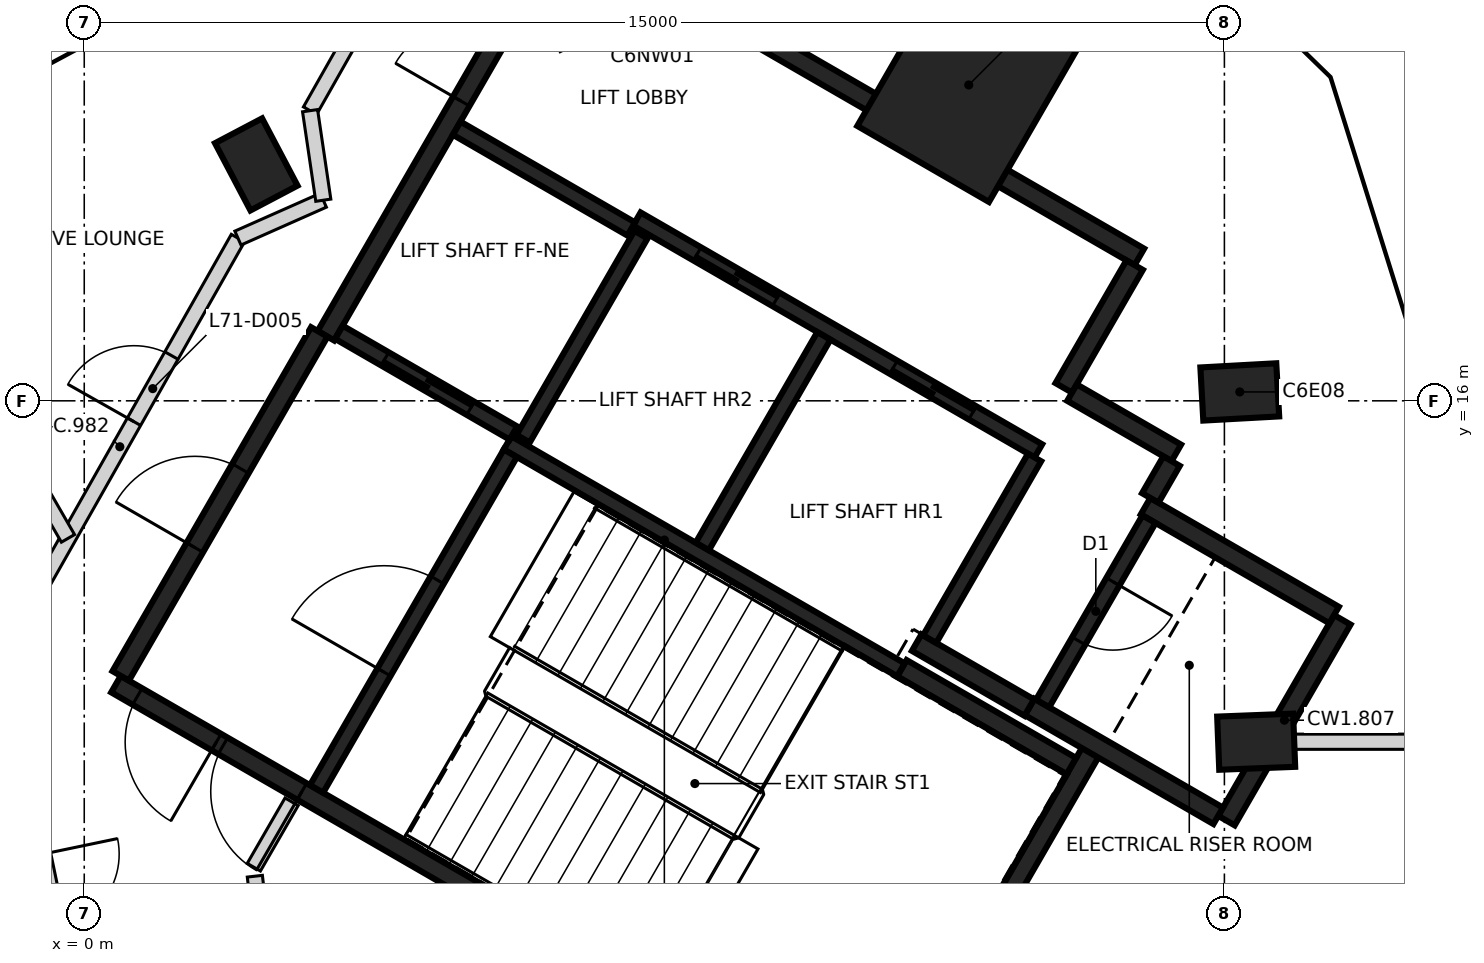
"""IFC4 building model, lengths in metres.
Left out: names, types, materials, properties, quantities, classifications, styles, units other than length and angle.
Written with IfcOpenShell. Run it as: python <this file> out.ifc"""

import sys

from ifc_helpers import new_model, si_unit, direction, frame, frame_2d, origin, origin_2d, place, context, subcontext, project, spatial, rectangle, extrude, element, fill, save


model = new_model("IFC4")
c1 = context("Model", 3, precision=1e-05, world=origin(), true_north=direction((0.0, 1.0)))
c2 = subcontext(c1, "Body", "Model", "MODEL_VIEW")
j1 = project(units=[si_unit("LENGTHUNIT", "METRE"), si_unit("PLANEANGLEUNIT", "RADIAN")], contexts=[c1])
p1 = place(None, origin())
s1 = spatial("IfcSite", under=j1, at=p1, CompositionType="ELEMENT")
p2 = place(p1, origin())
s2 = spatial("IfcBuilding", under=s1, at=p2, CompositionType="ELEMENT")
p3 = place(p2, frame((0.0, 0.0, 280.2)))
s3 = spatial("IfcBuildingStorey", under=s2, at=p3, CompositionType="ELEMENT", Elevation=280.2)
for number, where, z_axis, x_axis in (
    (1, (15.418, 11.515, -0.35), (0.0, 0.0, 1.0), (0.999, 0.039, 0.0)),
    (2, (15.202, 16.117, -0.35), (0.0, 0.0, 1.0), (0.998, 0.055, 0.0)),
    (3, (2.263, 19.11, -0.35), (0.0, 0.0, 1.0), (-0.466, 0.885, 0.0)),
):
    element("IfcColumn", number, at=place(p3, frame(where, z_axis=z_axis, x_axis=x_axis)), inside=s3, PredefinedType="COLUMN", context=c2, shape_type="SweptSolid", body=[
        extrude(rectangle(XDim=1.0, YDim=0.7, at=origin_2d()), origin(), (0.0, 0.0, 1.0), 3.6),
    ])
p4 = place(p3, frame((11.637, 20.155, -0.35), z_axis=(0.0, 0.0, 1.0), x_axis=(0.5, 0.866025403784, 0.0)))
e4 = element("IfcColumn", 4, at=p4, inside=s3, PredefinedType="COLUMN", context=c2, shape_type="SweptSolid", body=[
    extrude(rectangle(XDim=2.4, YDim=2.0, at=origin_2d()), origin(), (0.0, 0.0, 1.0), 3.6),
])
p5 = place(p3, frame((10.42, 6.498, 0.0), z_axis=(0.0, 0.0, 1.0), x_axis=(-0.866021906294, 0.500006057782, 0.0)))
e5 = element("IfcWall", 5, at=p5, inside=s3, PredefinedType="SHEAR", context=c2, shape_type="SweptSolid", body=[
    extrude(rectangle(XDim=11.55, YDim=0.25, at=frame_2d((5.775, 0.0))), origin(), (0.0, 0.0, 1.0), 3.25),
])
p6 = place(p5, frame((10.025, 0.0, 0.0)))
e6 = element("IfcOpeningElement", 6, at=p6, cuts=e5, PredefinedType="OPENING", context=c2, shape_type="SweptSolid", body=[
    extrude(rectangle(XDim=1.2, YDim=2.1, at=frame_2d((0.6, 1.05))), frame((0.0, 0.135, 0.0), z_axis=(0.0, -1.0, 0.0), x_axis=(1.0, 0.0, 0.0)), (0.0, 0.0, 1.0), 0.27),
])
p7 = place(p5, frame((8.725, 0.0, 0.0)))
e7 = element("IfcOpeningElement", 7, at=p7, cuts=e5, PredefinedType="OPENING", context=c2, shape_type="SweptSolid", body=[
    extrude(rectangle(XDim=1.2, YDim=2.1, at=frame_2d((0.6, 1.05))), frame((0.0, 0.135, 0.0), z_axis=(0.0, -1.0, 0.0), x_axis=(1.0, 0.0, 0.0)), (0.0, 0.0, 1.0), 0.27),
])
p8 = place(p3, frame((6.304, 22.269, 0.0), z_axis=(0.0, 0.0, 1.0), x_axis=(0.866022959057, -0.500004234368, 0.0)))
e8 = element("IfcWall", 8, at=p8, inside=s3, PredefinedType="SHEAR", context=c2, shape_type="SweptSolid", body=[
    extrude(rectangle(XDim=8.75, YDim=0.25, at=frame_2d((4.375, 0.0))), origin(), (0.0, 0.0, 1.0), 3.25),
])
p9 = place(p3, frame((3.179, 16.856, 0.0), z_axis=(0.0, 0.0, 1.0), x_axis=(0.500001955336, 0.866024274868, 0.0)))
e9 = element("IfcWall", 9, at=p9, inside=s3, PredefinedType="SHEAR", context=c2, shape_type="SweptSolid", body=[
    extrude(rectangle(XDim=6.125, YDim=0.25, at=frame_2d((3.062, 0.0))), origin(), (0.0, 0.0, 1.0), 3.25),
])
p10 = place(p9, frame((3.563, 0.0, 0.0)))
e10 = element("IfcOpeningElement", 10, at=p10, cuts=e9, PredefinedType="OPENING", context=c2, shape_type="SweptSolid", body=[
    extrude(rectangle(XDim=1.0, YDim=2.1, at=frame_2d((0.5, 1.05))), frame((0.0, 0.135, 0.0), z_axis=(0.0, -1.0, 0.0), x_axis=(1.0, 0.0, 0.0)), (0.0, 0.0, 1.0), 0.27),
])
p11 = place(p3, frame((0.48, 12.381, 0.0), z_axis=(0.0, 0.0, 1.0), x_axis=(0.49999885962, 0.866026062182, 0.0)))
e11 = element("IfcWall", 11, at=p11, inside=s3, PredefinedType="SHEAR", context=c2, shape_type="SweptSolid", body=[
    extrude(rectangle(XDim=5.225, YDim=0.25, at=frame_2d((2.612, 0.0))), origin(), (0.0, 0.0, 1.0), 3.25),
])
p12 = place(p11, frame((1.95, 0.0, 0.0)))
e12 = element("IfcOpeningElement", 12, at=p12, cuts=e11, PredefinedType="OPENING", context=c2, shape_type="SweptSolid", body=[
    extrude(rectangle(XDim=1.2, YDim=2.1, at=frame_2d((0.6, 1.05))), frame((0.0, 0.135, 0.0), z_axis=(0.0, -1.0, 0.0), x_axis=(1.0, 0.0, 0.0)), (0.0, 0.0, 1.0), 0.27),
])
p13 = place(p3, frame((13.238, 11.378, 0.0), z_axis=(0.0, 0.0, 1.0), x_axis=(-0.500008851346, -0.866020293397, 0.0)))
e13 = element("IfcWall", 13, at=p13, inside=s3, PredefinedType="SHEAR", context=c2, shape_type="SweptSolid", body=[
    extrude(rectangle(XDim=5.51, YDim=0.25, at=frame_2d((2.755, 0.0))), origin(), (0.0, 0.0, 1.0), 3.25),
])
p14 = place(p3, frame((16.552, 13.119, 0.0), z_axis=(0.0, 0.0, 1.0), x_axis=(-0.499978833458, -0.866037623948, 0.0)))
e14 = element("IfcWall", 14, at=p14, inside=s3, PredefinedType="SHEAR", context=c2, shape_type="SweptSolid", body=[
    extrude(rectangle(XDim=3.05, YDim=0.25, at=frame_2d((1.525, 0.0))), origin(), (0.0, 0.0, 1.0), 3.25),
])
p15 = place(p3, frame((14.918, 10.54, 0.0), z_axis=(0.0, 0.0, 1.0), x_axis=(-0.866063538972, 0.499933942099, 0.0)))
e15 = element("IfcWall", 15, at=p15, inside=s3, PredefinedType="SHEAR", context=c2, shape_type="SweptSolid", body=[
    extrude(rectangle(XDim=2.865, YDim=0.25, at=frame_2d((1.432, 0.0))), origin(), (0.0, 0.0, 1.0), 3.25),
])
p16 = place(p3, frame((13.963, 14.614, 0.0), z_axis=(0.0, 0.0, 1.0), x_axis=(0.866042235819, -0.499970844928, 0.0)))
e16 = element("IfcWall", 16, at=p16, inside=s3, PredefinedType="SHEAR", context=c2, shape_type="SweptSolid", body=[
    extrude(rectangle(XDim=2.865, YDim=0.25, at=frame_2d((1.432, 0.0))), origin(), (0.0, 0.0, 1.0), 3.25),
])
p17 = place(p3, frame((10.757, 12.481, 0.0), z_axis=(0.0, 0.0, 1.0), x_axis=(0.866022940537, -0.500004266446, 0.0)))
e17 = element("IfcWall", 17, at=p17, inside=s3, PredefinedType="SHEAR", context=c2, shape_type="SweptSolid", body=[
    extrude(rectangle(XDim=2.575, YDim=0.25, at=frame_2d((1.287, 0.0))), origin(), (0.0, 0.0, 1.0), 3.25),
])
p18 = place(p3, frame((13.819, 17.785, 0.0), z_axis=(0.0, 0.0, 1.0), x_axis=(-0.500039802285, -0.866002422705, 0.0)))
e18 = element("IfcWall", 18, at=p18, inside=s3, PredefinedType="SHEAR", context=c2, shape_type="SweptSolid", body=[
    extrude(rectangle(XDim=1.865, YDim=0.25, at=frame_2d((0.932, 0.0))), origin(), (0.0, 0.0, 1.0), 3.25),
])
p19 = place(p3, frame((12.433, 11.964, 0.0), z_axis=(0.0, 0.0, 1.0), x_axis=(-0.866038183914, 0.499977863513, 0.0)))
e19 = element("IfcWall", 19, at=p19, inside=s3, PredefinedType="SHEAR", context=c2, shape_type="SweptSolid", body=[
    extrude(rectangle(XDim=1.71, YDim=0.25, at=frame_2d((0.855, 0.0))), origin(), (0.0, 0.0, 1.0), 3.25),
])
p20 = place(p3, frame((12.995, 16.108, 0.0), z_axis=(0.0, 0.0, 1.0), x_axis=(0.866044474677, -0.49996696679, 0.0)))
e20 = element("IfcWall", 20, at=p20, inside=s3, PredefinedType="SHEAR", context=c2, shape_type="SweptSolid", body=[
    extrude(rectangle(XDim=1.584, YDim=0.25, at=frame_2d((0.792, 0.0))), origin(), (0.0, 0.0, 1.0), 3.25),
])
p21 = place(p3, frame((14.305, 15.207, 0.0), z_axis=(0.0, 0.0, 1.0), x_axis=(-0.499848422343, -0.866112899501, 0.0)))
e21 = element("IfcWall", 21, at=p21, inside=s3, PredefinedType="SHEAR", context=c2, shape_type="SweptSolid", body=[
    extrude(rectangle(XDim=0.559, YDim=0.25, at=frame_2d((0.28, 0.0))), origin(), (0.0, 0.0, 1.0), 3.25),
])
p22 = place(p3, frame((12.552, 15.342, 0.0), z_axis=(0.0, 0.0, 1.0), x_axis=(-0.866030299012, 0.499991521122, 0.0)))
e22 = element("IfcWall", 22, at=p22, inside=s3, PredefinedType="SHEAR", context=c2, shape_type="SweptSolid", body=[
    extrude(rectangle(XDim=6.1, YDim=0.2, at=frame_2d((3.05, 0.0))), origin(), (0.0, 0.0, 1.0), 3.25),
])
p23 = place(p22, frame((1.0, 0.0, 0.0)))
e23 = element("IfcOpeningElement", 23, at=p23, cuts=e22, PredefinedType="OPENING", context=c2, shape_type="SweptSolid", body=[
    extrude(rectangle(XDim=1.2, YDim=2.1, at=frame_2d((0.6, 1.05))), frame((0.0, 0.11, 0.0), z_axis=(0.0, -1.0, 0.0), x_axis=(1.0, 0.0, 0.0)), (0.0, 0.0, 1.0), 0.22),
])
p24 = place(p22, frame((3.982, 0.0, 0.0)))
e24 = element("IfcOpeningElement", 24, at=p24, cuts=e22, PredefinedType="OPENING", context=c2, shape_type="SweptSolid", body=[
    extrude(rectangle(XDim=1.2, YDim=2.1, at=frame_2d((0.6, 1.05))), frame((0.0, 0.11, 0.0), z_axis=(0.0, -1.0, 0.0), x_axis=(1.0, 0.0, 0.0)), (0.0, 0.0, 1.0), 0.22),
])
p25 = place(p3, frame((10.743, 12.46, 0.0), z_axis=(0.0, 0.0, 1.0), x_axis=(-0.866018848283, 0.500011354289, 0.0)))
e25 = element("IfcWall", 25, at=p25, inside=s3, PredefinedType="SHEAR", context=c2, shape_type="SweptSolid", body=[
    extrude(rectangle(XDim=5.974, YDim=0.2, at=frame_2d((2.987, 0.0))), origin(), (0.0, 0.0, 1.0), 3.25),
])
p26 = place(p3, frame((3.057, 10.895, 0.0), z_axis=(0.0, 0.0, 1.0), x_axis=(0.500027839223, 0.866009330205, 0.0)))
e26 = element("IfcWall", 26, at=p26, inside=s3, PredefinedType="SHEAR", context=c2, shape_type="SweptSolid", body=[
    extrude(rectangle(XDim=5.098, YDim=0.2, at=frame_2d((2.549, 0.0))), origin(), (0.0, 0.0, 1.0), 3.25),
])
p27 = place(p26, frame((1.774, 0.0, 0.0)))
e27 = element("IfcOpeningElement", 27, at=p27, cuts=e26, PredefinedType="OPENING", context=c2, shape_type="SweptSolid", body=[
    extrude(rectangle(XDim=1.4, YDim=2.1, at=frame_2d((0.7, 1.05))), frame((0.0, 0.11, 0.0), z_axis=(0.0, -1.0, 0.0), x_axis=(1.0, 0.0, 0.0)), (0.0, 0.0, 1.0), 0.22),
])
p28 = place(p3, frame((8.132, 14.084, 0.0), z_axis=(0.0, 0.0, 1.0), x_axis=(0.500030834389, 0.86600760081, 0.0)))
e28 = element("IfcWall", 28, at=p28, inside=s3, PredefinedType="SHEAR", context=c2, shape_type="SweptSolid", body=[
    extrude(rectangle(XDim=3.198, YDim=0.2, at=frame_2d((1.599, 0.0))), origin(), (0.0, 0.0, 1.0), 3.25),
])
p29 = place(p3, frame((14.008, 14.442, 0.0), z_axis=(0.0, 0.0, 1.0), x_axis=(-0.499986818241, -0.866033014143, 0.0)))
e29 = element("IfcWall", 29, at=p29, inside=s3, PredefinedType="SHEAR", context=c2, shape_type="SweptSolid", body=[
    extrude(rectangle(XDim=2.798, YDim=0.2, at=frame_2d((1.399, 0.0))), origin(), (0.0, 0.0, 1.0), 3.25),
])
p30 = place(p29, frame((0.949, 0.0, 0.0)))
e30 = element("IfcOpeningElement", 30, at=p30, cuts=e29, PredefinedType="OPENING", context=c2, shape_type="SweptSolid", body=[
    extrude(rectangle(XDim=0.9, YDim=2.1, at=frame_2d((0.45, 1.05))), frame((0.0, 0.11, 0.0), z_axis=(0.0, -1.0, 0.0), x_axis=(1.0, 0.0, 0.0)), (0.0, 0.0, 1.0), 0.22),
])
p31 = place(p3, frame((12.502, 15.255, 0.0), z_axis=(0.0, 0.0, 1.0), x_axis=(-0.499965018551, -0.866045599391, 0.0)))
e31 = element("IfcWall", 31, at=p31, inside=s3, PredefinedType="SHEAR", context=c2, shape_type="SweptSolid", body=[
    extrude(rectangle(XDim=2.759, YDim=0.2, at=frame_2d((1.379, 0.0))), origin(), (0.0, 0.0, 1.0), 3.25),
])
p32 = place(p3, frame((7.324, 18.187, 0.0), z_axis=(0.0, 0.0, 1.0), x_axis=(-0.499967891604, -0.866043940782, 0.0)))
e32 = element("IfcWall", 32, at=p32, inside=s3, PredefinedType="SHEAR", context=c2, shape_type="SweptSolid", body=[
    extrude(rectangle(XDim=3.1, YDim=0.2, at=frame_2d((1.55, 0.0))), origin(), (0.0, 0.0, 1.0), 3.25),
])
p33 = place(p3, frame((5.646, 15.576, 0.0), z_axis=(0.0, 0.0, 1.0), x_axis=(-0.866018407898, 0.500012117035, 0.0)))
e33 = element("IfcWall", 33, at=p33, inside=s3, PredefinedType="SHEAR", context=c2, shape_type="SweptSolid", body=[
    extrude(rectangle(XDim=2.651, YDim=0.2, at=frame_2d((1.325, 0.0))), origin(), (0.0, 0.0, 1.0), 3.25),
])
p34 = place(p33, frame((0.652, 0.0, 0.0)))
e34 = element("IfcOpeningElement", 34, at=p34, cuts=e33, PredefinedType="OPENING", context=c2, shape_type="SweptSolid", body=[
    extrude(rectangle(XDim=1.3, YDim=2.1, at=frame_2d((0.65, 1.05))), frame((0.0, 0.11, 0.0), z_axis=(0.0, -1.0, 0.0), x_axis=(1.0, 0.0, 0.0)), (0.0, 0.0, 1.0), 0.22),
])
p35 = place(p3, frame((7.196, 18.26, 0.0), z_axis=(0.0, 0.0, 1.0), x_axis=(-0.866018407898, 0.500012117035, 0.0)))
e35 = element("IfcWall", 35, at=p35, inside=s3, PredefinedType="SHEAR", context=c2, shape_type="SweptSolid", body=[
    extrude(rectangle(XDim=2.651, YDim=0.2, at=frame_2d((1.325, 0.0))), origin(), (0.0, 0.0, 1.0), 3.25),
])
p36 = place(p3, frame((-1.086, 12.65, 0.0), z_axis=(0.0, 0.0, 1.0), x_axis=(0.492563383526, 0.870276572826, 0.0)))
e36 = element("IfcWall", 36, at=p36, inside=s3, PredefinedType="PARTITIONING", context=c2, shape_type="SweptSolid", body=[
    extrude(rectangle(XDim=6.309, YDim=0.2, at=frame_2d((3.155, 0.0))), origin(), (0.0, 0.0, 1.0), 3.25),
])
p37 = place(p36, frame((3.533, 0.0, 0.0)))
e37 = element("IfcOpeningElement", 37, at=p37, cuts=e36, PredefinedType="OPENING", context=c2, shape_type="SweptSolid", body=[
    extrude(rectangle(XDim=1.0, YDim=2.1, at=frame_2d((0.5, 1.05))), frame((0.0, 0.11, 0.0), z_axis=(0.0, -1.0, 0.0), x_axis=(1.0, 0.0, 0.0)), (0.0, 0.0, 1.0), 0.22),
])
p38 = place(p3, frame((-1.085, 12.65, 0.0), z_axis=(0.0, 0.0, 1.0), x_axis=(0.203998862084, -0.97897112535, 0.0)))
e38 = element("IfcWall", 38, at=p38, inside=s3, PredefinedType="PARTITIONING", context=c2, shape_type="SweptSolid", body=[
    extrude(rectangle(XDim=6.338, YDim=0.2, at=frame_2d((3.169, 0.0))), origin(), (0.0, 0.0, 1.0), 3.25),
])
p39 = place(p38, frame((2.669, 0.0, 0.0)))
e39 = element("IfcOpeningElement", 39, at=p39, cuts=e38, PredefinedType="OPENING", context=c2, shape_type="SweptSolid", body=[
    extrude(rectangle(XDim=1.0, YDim=2.1, at=frame_2d((0.5, 1.05))), frame((0.0, 0.11, 0.0), z_axis=(0.0, -1.0, 0.0), x_axis=(1.0, 0.0, 0.0)), (0.0, 0.0, 1.0), 0.22),
])
p40 = place(p3, frame((2.022, 18.141, 0.0), z_axis=(0.0, 0.0, 1.0), x_axis=(0.914212683456, 0.405234709036, 0.0)))
e40 = element("IfcWall", 40, at=p40, inside=s3, PredefinedType="PARTITIONING", context=c2, shape_type="SweptSolid", body=[
    extrude(rectangle(XDim=1.229, YDim=0.2, at=frame_2d((0.614, 0.0))), origin(), (0.0, 0.0, 1.0), 3.25),
])
p41 = place(p3, frame((2.592, 6.719, 0.0), z_axis=(0.0, 0.0, 1.0), x_axis=(-0.114027951455, 0.993477541914, 0.0)))
e41 = element("IfcWall", 41, at=p41, inside=s3, PredefinedType="PARTITIONING", context=c2, shape_type="SweptSolid", body=[
    extrude(rectangle(XDim=3.047, YDim=0.2, at=frame_2d((1.523, 0.0))), origin(), (0.0, 0.0, 1.0), 3.25),
])
p42 = place(p41, frame((1.083, 0.0, 0.0)))
e42 = element("IfcOpeningElement", 42, at=p42, cuts=e41, PredefinedType="OPENING", context=c2, shape_type="SweptSolid", body=[
    extrude(rectangle(XDim=1.0, YDim=2.1, at=frame_2d((0.5, 1.05))), frame((0.0, 0.11, 0.0), z_axis=(0.0, -1.0, 0.0), x_axis=(1.0, 0.0, 0.0)), (0.0, 0.0, 1.0), 0.22),
])
p43 = place(p3, frame((2.231, 9.864, 0.0), z_axis=(0.0, 0.0, 1.0), x_axis=(0.499942098031, 0.866058830921, 0.0)))
e43 = element("IfcWall", 43, at=p43, inside=s3, PredefinedType="PARTITIONING", context=c2, shape_type="SweptSolid", body=[
    extrude(rectangle(XDim=0.994, YDim=0.2, at=frame_2d((0.497, 0.0))), origin(), (0.0, 0.0, 1.0), 3.25),
])
p44 = place(p3, frame((2.971, 19.817, 0.0), z_axis=(0.0, 0.0, 1.0), x_axis=(0.492596700535, 0.870257715061, 0.0)))
e44 = element("IfcWall", 44, at=p44, inside=s3, PredefinedType="PARTITIONING", context=c2, shape_type="SweptSolid", body=[
    extrude(rectangle(XDim=2.296, YDim=0.2, at=frame_2d((1.148, 0.0))), origin(), (0.0, 0.0, 1.0), 3.25),
])
p45 = place(p3, frame((2.971, 19.817, 0.0), z_axis=(0.0, 0.0, 1.0), x_axis=(0.146184555477, -0.989257335449, 0.0)))
e45 = element("IfcWall", 45, at=p45, inside=s3, PredefinedType="PARTITIONING", context=c2, shape_type="SweptSolid", body=[
    extrude(rectangle(XDim=1.191, YDim=0.2, at=frame_2d((0.595, 0.0))), origin(), (0.0, 0.0, 1.0), 2.35),
])
p46 = place(p3, frame((-3.02, 19.05, 0.0), z_axis=(0.0, 0.0, 1.0), x_axis=(0.499943402613, -0.866058077835, 0.0)))
e46 = element("IfcWall", 46, at=p46, inside=s3, PredefinedType="PARTITIONING", context=c2, shape_type="SweptSolid", body=[
    extrude(rectangle(XDim=5.612, YDim=0.2, at=frame_2d((2.806, 0.0))), origin(), (0.0, 0.0, 1.0), 3.25),
])
p47 = place(p3, frame((15.84, 11.515, 0.0), z_axis=(0.0, 0.0, 1.0), x_axis=(1.0, 0.0, 0.0)))
e47 = element("IfcWall", 47, at=p47, inside=s3, PredefinedType="PARTITIONING", context=c2, shape_type="SweptSolid", body=[
    extrude(rectangle(XDim=2.025, YDim=0.2, at=frame_2d((1.012, 0.0))), origin(), (0.0, 0.0, 1.0), 3.25),
])
p48 = place(p34, origin())
e48 = element("IfcDoor", 48, at=p48, inside=s3, OperationType="SLIDING_TO_LEFT", PredefinedType="DOOR", context=c2, shape_type="SweptSolid", body=[
    extrude(rectangle(XDim=1.3, YDim=2.1, at=frame_2d((0.65, 1.05))), frame((0.0, 0.025, 0.0), z_axis=(0.0, -1.0, 0.0), x_axis=(1.0, 0.0, 0.0)), (0.0, 0.0, 1.0), 0.05),
])
fill(e34, e48)
p49 = place(p23, origin())
e49 = element("IfcDoor", 49, at=p49, inside=s3, OperationType="DOUBLE_DOOR_SLIDING", PredefinedType="DOOR", context=c2, shape_type="SweptSolid", body=[
    extrude(rectangle(XDim=1.2, YDim=2.1, at=frame_2d((0.6, 1.05))), frame((0.0, 0.025, 0.0), z_axis=(0.0, -1.0, 0.0), x_axis=(1.0, 0.0, 0.0)), (0.0, 0.0, 1.0), 0.05),
])
fill(e23, e49)
p50 = place(p24, origin())
e50 = element("IfcDoor", 50, at=p50, inside=s3, OperationType="DOUBLE_DOOR_SLIDING", PredefinedType="DOOR", context=c2, shape_type="SweptSolid", body=[
    extrude(rectangle(XDim=1.2, YDim=2.1, at=frame_2d((0.6, 1.05))), frame((0.0, 0.025, 0.0), z_axis=(0.0, -1.0, 0.0), x_axis=(1.0, 0.0, 0.0)), (0.0, 0.0, 1.0), 0.05),
])
fill(e24, e50)
p51 = place(p10, origin())
e51 = element("IfcDoor", 51, at=p51, inside=s3, OperationType="SINGLE_SWING_LEFT", PredefinedType="DOOR", context=c2, shape_type="SweptSolid", body=[
    extrude(rectangle(XDim=1.0, YDim=2.1, at=frame_2d((0.5, 1.05))), frame((0.0, 0.025, 0.0), z_axis=(0.0, -1.0, 0.0), x_axis=(1.0, 0.0, 0.0)), (0.0, 0.0, 1.0), 0.05),
])
fill(e10, e51)
p52 = place(p6, origin())
e52 = element("IfcDoor", 52, at=p52, inside=s3, OperationType="SINGLE_SWING_LEFT", PredefinedType="DOOR", context=c2, shape_type="SweptSolid", body=[
    extrude(rectangle(XDim=1.2, YDim=2.1, at=frame_2d((0.6, 1.05))), frame((0.0, 0.025, 0.0), z_axis=(0.0, -1.0, 0.0), x_axis=(1.0, 0.0, 0.0)), (0.0, 0.0, 1.0), 0.05),
])
fill(e6, e52)
p53 = place(p7, origin())
e53 = element("IfcDoor", 53, at=p53, inside=s3, OperationType="SINGLE_SWING_RIGHT", PredefinedType="DOOR", context=c2, shape_type="SweptSolid", body=[
    extrude(rectangle(XDim=1.2, YDim=2.1, at=frame_2d((0.6, 1.05))), frame((0.0, 0.025, 0.0), z_axis=(0.0, -1.0, 0.0), x_axis=(1.0, 0.0, 0.0)), (0.0, 0.0, 1.0), 0.05),
])
fill(e7, e53)
p54 = place(p27, origin())
e54 = element("IfcDoor", 54, at=p54, inside=s3, OperationType="SINGLE_SWING_LEFT", PredefinedType="DOOR", context=c2, shape_type="SweptSolid", body=[
    extrude(rectangle(XDim=1.4, YDim=2.1, at=frame_2d((0.7, 1.05))), frame((0.0, 0.025, 0.0), z_axis=(0.0, -1.0, 0.0), x_axis=(1.0, 0.0, 0.0)), (0.0, 0.0, 1.0), 0.05),
])
fill(e27, e54)
p55 = place(p30, origin())
e55 = element("IfcDoor", 55, at=p55, inside=s3, OperationType="SINGLE_SWING_RIGHT", PredefinedType="DOOR", context=c2, shape_type="SweptSolid", body=[
    extrude(rectangle(XDim=0.9, YDim=2.1, at=frame_2d((0.45, 1.05))), frame((0.0, 0.025, 0.0), z_axis=(0.0, -1.0, 0.0), x_axis=(1.0, 0.0, 0.0)), (0.0, 0.0, 1.0), 0.05),
])
fill(e30, e55)
p56 = place(p12, origin())
e56 = element("IfcDoor", 56, at=p56, inside=s3, OperationType="SINGLE_SWING_RIGHT", PredefinedType="DOOR", context=c2, shape_type="SweptSolid", body=[
    extrude(rectangle(XDim=1.2, YDim=2.1, at=frame_2d((0.6, 1.05))), frame((0.0, 0.025, 0.0), z_axis=(0.0, -1.0, 0.0), x_axis=(1.0, 0.0, 0.0)), (0.0, 0.0, 1.0), 0.05),
])
fill(e12, e56)
p57 = place(p37, frame((1.0, 0.0, 0.0), z_axis=(0.0, 0.0, 1.0), x_axis=(-1.0, 0.0, 0.0)))
e57 = element("IfcDoor", 57, at=p57, inside=s3, OperationType="SINGLE_SWING_LEFT", PredefinedType="DOOR", context=c2, shape_type="SweptSolid", body=[
    extrude(rectangle(XDim=1.0, YDim=2.1, at=frame_2d((0.5, 1.05))), frame((0.0, 0.025, 0.0), z_axis=(0.0, -1.0, 0.0), x_axis=(1.0, 0.0, 0.0)), (0.0, 0.0, 1.0), 0.05),
])
fill(e37, e57)
p58 = place(p39, frame((1.0, 0.0, 0.0), z_axis=(0.0, 0.0, 1.0), x_axis=(-1.0, 0.0, 0.0)))
e58 = element("IfcDoor", 58, at=p58, inside=s3, OperationType="SINGLE_SWING_LEFT", PredefinedType="DOOR", context=c2, shape_type="SweptSolid", body=[
    extrude(rectangle(XDim=1.0, YDim=2.1, at=frame_2d((0.5, 1.05))), frame((0.0, 0.025, 0.0), z_axis=(0.0, -1.0, 0.0), x_axis=(1.0, 0.0, 0.0)), (0.0, 0.0, 1.0), 0.05),
])
fill(e39, e58)
save(model, sys.argv[1])
